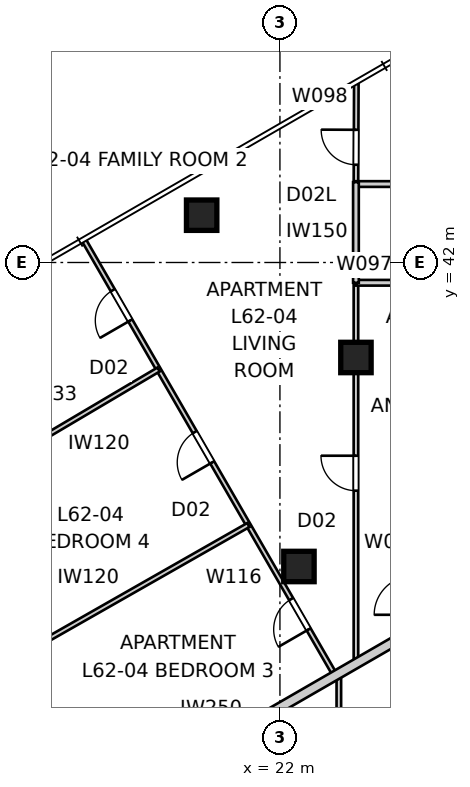
"""IFC4 building model, lengths in metres.
Left out: names, types, materials, properties, quantities, classifications, styles, units other than length and angle.
Written with IfcOpenShell. Run it as: python <this file> out.ifc"""

import sys

from ifc_helpers import new_model, si_unit, direction, frame, frame_2d, origin, origin_2d, place, context, subcontext, project, spatial, rectangle, extrude, element, fill, save


model = new_model("IFC4")
c1 = context("Model", 3, precision=1e-05, world=origin(), true_north=direction((0.0, 1.0)))
c2 = subcontext(c1, "Body", "Model", "MODEL_VIEW")
j1 = project(units=[si_unit("LENGTHUNIT", "METRE"), si_unit("PLANEANGLEUNIT", "RADIAN")], contexts=[c1])
p1 = place(None, origin())
s1 = spatial("IfcSite", under=j1, at=p1, CompositionType="ELEMENT")
p2 = place(p1, origin())
s2 = spatial("IfcBuilding", under=s1, at=p2, CompositionType="ELEMENT")
p3 = place(p2, frame((0.0, 0.0, 225.2)))
s3 = spatial("IfcBuildingStorey", under=s2, at=p3, CompositionType="ELEMENT", Elevation=225.2)
for number, where, z_axis, x_axis in (
    (1, (19.94, 43.245, 0.0), (0.0, 0.0, 1.0), (1.0, 0.0, 0.0)),
    (2, (24.0, 39.5, 0.0), (0.0, 0.0, 1.0), (1.0, 0.0, 0.0)),
    (3, (22.5, 34.0, 0.0), (0.0, 0.0, 1.0), (1.0, 0.0, 0.0)),
):
    element("IfcColumn", number, at=place(p3, frame(where, z_axis=z_axis, x_axis=x_axis)), inside=s3, PredefinedType="COLUMN", context=c2, shape_type="SweptSolid", body=[
        extrude(rectangle(XDim=0.8, YDim=0.8, at=origin_2d()), origin(), (0.0, 0.0, 1.0), 3.4),
    ])
p4 = place(p3, frame((15.889, 26.761, 0.0), z_axis=(0.0, 0.0, 1.0), x_axis=(0.866024069551, 0.500002310952, 0.0)))
e4 = element("IfcWall", 4, at=p4, inside=s3, PredefinedType="PARTITIONING", context=c2, shape_type="SweptSolid", body=[
    extrude(rectangle(XDim=10.95, YDim=0.25, at=frame_2d((5.475, 0.0))), origin(), (0.0, 0.0, 1.0), 3.25),
])
p5 = place(p3, frame((23.55, 26.598, 0.0), z_axis=(0.0, 0.0, 1.0), x_axis=(0.0, 1.0, 0.0)))
e5 = element("IfcWall", 5, at=p5, inside=s3, PredefinedType="PARTITIONING", context=c2, shape_type="SweptSolid", body=[
    extrude(rectangle(XDim=4.585, YDim=0.12, at=frame_2d((2.292, 0.0))), origin(), (0.0, 0.0, 1.0), 3.25),
])
p6 = place(p5, frame((1.833, 0.0, 0.0)))
e6 = element("IfcOpeningElement", 6, at=p6, cuts=e5, PredefinedType="OPENING", context=c2, shape_type="SweptSolid", body=[
    extrude(rectangle(XDim=0.92, YDim=2.34, at=frame_2d((0.46, 1.17))), frame((0.0, 0.07, 0.0), z_axis=(0.0, -1.0, 0.0), x_axis=(1.0, 0.0, 0.0)), (0.0, 0.0, 1.0), 0.14),
])
p7 = place(p3, frame((24.0, 31.443, 0.0), z_axis=(0.0, 0.0, 1.0), x_axis=(0.0, 1.0, 0.0)))
e7 = element("IfcWall", 7, at=p7, inside=s3, PredefinedType="PARTITIONING", context=c2, shape_type="SweptSolid", body=[
    extrude(rectangle(XDim=10.023, YDim=0.12, at=frame_2d((5.012, 0.0))), origin(), (0.0, 0.0, 1.0), 2.55),
])
p8 = place(p7, frame((4.552, 0.0, 0.0)))
e8 = element("IfcOpeningElement", 8, at=p8, cuts=e7, PredefinedType="OPENING", context=c2, shape_type="SweptSolid", body=[
    extrude(rectangle(XDim=0.92, YDim=2.34, at=frame_2d((0.46, 1.17))), frame((0.0, 0.07, 0.0), z_axis=(0.0, -1.0, 0.0), x_axis=(1.0, 0.0, 0.0)), (0.0, 0.0, 1.0), 0.14),
])
p9 = place(p3, frame((24.0, 41.467, 0.0), z_axis=(0.0, 0.0, 1.0), x_axis=(1.0, 0.0, 0.0)))
e9 = element("IfcWall", 9, at=p9, inside=s3, PredefinedType="SOLIDWALL", context=c2, shape_type="SweptSolid", body=[
    extrude(rectangle(XDim=4.82, YDim=0.15, at=frame_2d((2.41, 0.0))), origin(), (0.0, 0.0, 1.0), 3.25),
])
p10 = place(p9, frame((1.49, 0.0, 0.0)))
e10 = element("IfcOpeningElement", 10, at=p10, cuts=e9, PredefinedType="OPENING", context=c2, shape_type="SweptSolid", body=[
    extrude(rectangle(XDim=0.92, YDim=2.1, at=frame_2d((0.46, 1.05))), frame((0.0, 0.085, 0.0), z_axis=(0.0, -1.0, 0.0), x_axis=(1.0, 0.0, 0.0)), (0.0, 0.0, 1.0), 0.17),
])
p11 = place(p3, frame((24.0, 44.115, 0.0), z_axis=(0.0, 0.0, 1.0), x_axis=(0.003773202081, 0.999992881448, 0.0)))
e11 = element("IfcWall", 11, at=p11, inside=s3, PredefinedType="PARTITIONING", context=c2, shape_type="SweptSolid", body=[
    extrude(rectangle(XDim=2.588, YDim=0.12, at=frame_2d((1.294, 0.0))), origin(), (0.0, 0.0, 1.0), 3.25),
])
p12 = place(p11, frame((0.458, 0.0, 0.0)))
e12 = element("IfcOpeningElement", 12, at=p12, cuts=e11, PredefinedType="OPENING", context=c2, shape_type="SweptSolid", body=[
    extrude(rectangle(XDim=0.92, YDim=2.1, at=frame_2d((0.46, 1.05))), frame((0.0, 0.07, 0.0), z_axis=(0.0, -1.0, 0.0), x_axis=(1.0, 0.0, 0.0)), (0.0, 0.0, 1.0), 0.14),
])
p13 = place(p3, frame((29.897, 44.065, 0.0), z_axis=(0.0, 0.0, 1.0), x_axis=(-1.0, 0.0, 0.0)))
e13 = element("IfcWall", 13, at=p13, inside=s3, PredefinedType="SOLIDWALL", context=c2, shape_type="SweptSolid", body=[
    extrude(rectangle(XDim=5.897, YDim=0.15, at=frame_2d((2.949, 0.0))), origin(), (0.0, 0.0, 1.0), 3.25),
])
p14 = place(p3, frame((23.457, 31.13, 0.0), z_axis=(0.0, 0.0, 1.0), x_axis=(-0.499999220117, 0.86602585405, 0.0)))
e14 = element("IfcWall", 14, at=p14, inside=s3, PredefinedType="PARTITIONING", context=c2, shape_type="SweptSolid", body=[
    extrude(rectangle(XDim=13.21, YDim=0.12, at=frame_2d((6.605, 0.0))), origin(), (0.0, 0.0, 1.0), 3.25),
])
p15 = place(p14, frame((6.478, 0.0, 0.0)))
e15 = element("IfcOpeningElement", 15, at=p15, cuts=e14, PredefinedType="OPENING", context=c2, shape_type="SweptSolid", body=[
    extrude(rectangle(XDim=0.92, YDim=2.34, at=frame_2d((0.46, 1.17))), frame((0.0, 0.07, 0.0), z_axis=(0.0, -1.0, 0.0), x_axis=(1.0, 0.0, 0.0)), (0.0, 0.0, 1.0), 0.14),
])
p16 = place(p14, frame((1.403, 0.0, 0.0)))
e16 = element("IfcOpeningElement", 16, at=p16, cuts=e14, PredefinedType="OPENING", context=c2, shape_type="SweptSolid", body=[
    extrude(rectangle(XDim=0.92, YDim=2.34, at=frame_2d((0.46, 1.17))), frame((0.0, 0.07, 0.0), z_axis=(0.0, -1.0, 0.0), x_axis=(1.0, 0.0, 0.0)), (0.0, 0.0, 1.0), 0.14),
])
p17 = place(p14, frame((10.79, 0.0, 0.0)))
e17 = element("IfcOpeningElement", 17, at=p17, cuts=e14, PredefinedType="OPENING", context=c2, shape_type="SweptSolid", body=[
    extrude(rectangle(XDim=0.92, YDim=2.34, at=frame_2d((0.46, 1.17))), frame((0.0, 0.07, 0.0), z_axis=(0.0, -1.0, 0.0), x_axis=(1.0, 0.0, 0.0)), (0.0, 0.0, 1.0), 0.14),
])
p18 = place(p3, frame((24.0, 44.115, 0.0), z_axis=(0.0, 0.0, 1.0), x_axis=(0.0, -1.0, 0.0)))
e18 = element("IfcWall", 18, at=p18, inside=s3, PredefinedType="SOLIDWALL", context=c2, shape_type="SweptSolid", body=[
    extrude(rectangle(XDim=2.648, YDim=0.15, at=frame_2d((1.324, 0.0))), origin(), (0.0, 0.0, 1.0), 3.25),
])
p19 = place(p3, frame((13.612, 30.786, 0.0), z_axis=(0.0, 0.0, 1.0), x_axis=(0.868878086013, 0.495026132286, 0.0)))
e19 = element("IfcWall", 19, at=p19, inside=s3, PredefinedType="PARTITIONING", context=c2, shape_type="SweptSolid", body=[
    extrude(rectangle(XDim=8.698, YDim=0.12, at=frame_2d((4.349, 0.0))), origin(), (0.0, 0.0, 1.0), 3.25),
])
p20 = place(p3, frame((14.763, 36.792, 0.0), z_axis=(0.0, 0.0, 1.0), x_axis=(0.860667778588, 0.509166942073, 0.0)))
e20 = element("IfcWall", 20, at=p20, inside=s3, PredefinedType="PARTITIONING", context=c2, shape_type="SweptSolid", body=[
    extrude(rectangle(XDim=4.698, YDim=0.12, at=frame_2d((2.349, 0.0))), origin(), (0.0, 0.0, 1.0), 3.25),
])
p21 = place(p8, origin())
e21 = element("IfcDoor", 21, at=p21, inside=s3, OperationType="SINGLE_SWING_RIGHT", PredefinedType="DOOR", context=c2, shape_type="SweptSolid", body=[
    extrude(rectangle(XDim=0.92, YDim=2.34, at=frame_2d((0.46, 1.17))), frame((0.0, 0.025, 0.0), z_axis=(0.0, -1.0, 0.0), x_axis=(1.0, 0.0, 0.0)), (0.0, 0.0, 1.0), 0.05),
])
fill(e8, e21)
p22 = place(p15, origin())
e22 = element("IfcDoor", 22, at=p22, inside=s3, OperationType="SINGLE_SWING_LEFT", PredefinedType="DOOR", context=c2, shape_type="SweptSolid", body=[
    extrude(rectangle(XDim=0.92, YDim=2.34, at=frame_2d((0.46, 1.17))), frame((0.0, 0.025, 0.0), z_axis=(0.0, -1.0, 0.0), x_axis=(1.0, 0.0, 0.0)), (0.0, 0.0, 1.0), 0.05),
])
fill(e15, e22)
p23 = place(p16, origin())
e23 = element("IfcDoor", 23, at=p23, inside=s3, OperationType="SINGLE_SWING_LEFT", PredefinedType="DOOR", context=c2, shape_type="SweptSolid", body=[
    extrude(rectangle(XDim=0.92, YDim=2.34, at=frame_2d((0.46, 1.17))), frame((0.0, 0.025, 0.0), z_axis=(0.0, -1.0, 0.0), x_axis=(1.0, 0.0, 0.0)), (0.0, 0.0, 1.0), 0.05),
])
fill(e16, e23)
p24 = place(p17, origin())
e24 = element("IfcDoor", 24, at=p24, inside=s3, OperationType="SINGLE_SWING_LEFT", PredefinedType="DOOR", context=c2, shape_type="SweptSolid", body=[
    extrude(rectangle(XDim=0.92, YDim=2.34, at=frame_2d((0.46, 1.17))), frame((0.0, 0.025, 0.0), z_axis=(0.0, -1.0, 0.0), x_axis=(1.0, 0.0, 0.0)), (0.0, 0.0, 1.0), 0.05),
])
fill(e17, e24)
p25 = place(p12, origin())
e25 = element("IfcDoor", 25, at=p25, inside=s3, OperationType="SINGLE_SWING_RIGHT", PredefinedType="DOOR", context=c2, shape_type="SweptSolid", body=[
    extrude(rectangle(XDim=0.92, YDim=2.1, at=frame_2d((0.46, 1.05))), frame((0.0, 0.025, 0.0), z_axis=(0.0, -1.0, 0.0), x_axis=(1.0, 0.0, 0.0)), (0.0, 0.0, 1.0), 0.05),
])
fill(e12, e25)
save(model, sys.argv[1])
